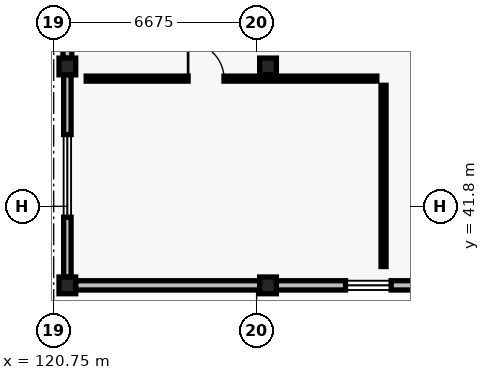
"""IFC4 building model, lengths in metres.
Left out: names, types, materials, properties, quantities, classifications, styles, units other than length and angle.
Written with IfcOpenShell. Run it as: python <this file> out.ifc"""

import sys

from ifc_helpers import new_model, si_unit, direction, frame, frame_2d, origin, origin_2d, place, context, subcontext, project, spatial, rectangle, extrude, element, fill, save


model = new_model("IFC4")
c1 = context("Model", 3, precision=1e-05, world=origin(), true_north=direction((0.0, 1.0)))
c2 = subcontext(c1, "Body", "Model", "MODEL_VIEW")
j1 = project(units=[si_unit("LENGTHUNIT", "METRE"), si_unit("PLANEANGLEUNIT", "RADIAN")], contexts=[c1])
p1 = place(None, origin())
s1 = spatial("IfcSite", under=j1, at=p1, CompositionType="ELEMENT")
p2 = place(p1, origin())
s2 = spatial("IfcBuilding", under=s1, at=p2, CompositionType="ELEMENT")
p3 = place(p2, frame((0.0, 0.0, 27.6)))
s3 = spatial("IfcBuildingStorey", under=s2, at=p3, CompositionType="ELEMENT", Elevation=27.6)
for number, where, z_axis, x_axis in (
    (1, (121.2, 39.2, 0.0), (0.0, 0.0, 1.0), (1.0, 0.0, 0.0)),
    (2, (121.2, 46.4, 0.0), (0.0, 0.0, 1.0), (1.0, 0.0, 0.0)),
    (3, (127.8, 39.2, 0.0), (0.0, 0.0, 1.0), (1.0, 0.0, 0.0)),
    (4, (127.8, 46.4, 0.0), (0.0, 0.0, 1.0), (1.0, 0.0, 0.0)),
):
    element("IfcColumn", number, at=place(p3, frame(where, z_axis=z_axis, x_axis=x_axis)), inside=s3, PredefinedType="COLUMN", context=c2, shape_type="SweptSolid", body=[
        extrude(rectangle(XDim=0.55, YDim=0.55, at=origin_2d()), origin(), (0.0, 0.0, 1.0), 4.3),
    ])
p4 = place(p3, frame((121.2, 39.47, 0.0), z_axis=(0.0, 0.0, 1.0), x_axis=(0.0, 1.0, 0.0)))
e5 = element("IfcWall", 5, at=p4, inside=s3, PredefinedType="STANDARD", context=c2, shape_type="SweptSolid", body=[
    extrude(rectangle(XDim=6.66, YDim=0.245, at=frame_2d((3.33, 0.0))), origin(), (0.0, 0.0, 1.0), 3.835),
])
p5 = place(p4, frame((1.97, 0.0, 0.95)))
e6 = element("IfcOpeningElement", 6, at=p5, cuts=e5, PredefinedType="OPENING", context=c2, shape_type="SweptSolid", body=[
    extrude(rectangle(XDim=2.72, YDim=1.44, at=frame_2d((1.36, 0.72))), frame((0.0, 0.123, 0.0), z_axis=(0.0, -1.0, 0.0), x_axis=(1.0, 0.0, 0.0)), (0.0, 0.0, 1.0), 0.245),
])
p6 = place(p3, frame((121.2, 46.67, 0.0), z_axis=(0.0, 0.0, 1.0), x_axis=(0.0, 1.0, 0.0)))
e7 = element("IfcWall", 7, at=p6, inside=s3, PredefinedType="STANDARD", context=c2, shape_type="SweptSolid", body=[
    extrude(rectangle(XDim=6.66, YDim=0.29, at=frame_2d((3.33, 0.0))), origin(), (0.0, 0.0, 1.0), 3.835),
])
p7 = place(p6, frame((2.43, 0.0, 0.95)))
e8 = element("IfcOpeningElement", 8, at=p7, cuts=e7, PredefinedType="OPENING", context=c2, shape_type="SweptSolid", body=[
    extrude(rectangle(XDim=1.8, YDim=1.65, at=frame_2d((0.9, 0.825))), frame((0.0, 0.145, 0.0), z_axis=(0.0, -1.0, 0.0), x_axis=(1.0, 0.0, 0.0)), (0.0, 0.0, 1.0), 0.29),
])
p8 = place(p3, frame((134.13, 39.2, 0.0), z_axis=(0.0, 0.0, 1.0), x_axis=(-1.0, 0.0, 0.0)))
e9 = element("IfcWall", 9, at=p8, inside=s3, PredefinedType="STANDARD", context=c2, shape_type="SweptSolid", body=[
    extrude(rectangle(XDim=6.06, YDim=0.305, at=frame_2d((3.03, 0.0))), origin(), (0.0, 0.0, 1.0), 3.835),
])
p9 = place(p8, frame((2.28, 0.0, 0.95)))
e10 = element("IfcOpeningElement", 10, at=p9, cuts=e9, PredefinedType="OPENING", context=c2, shape_type="SweptSolid", body=[
    extrude(rectangle(XDim=1.5, YDim=1.65, at=frame_2d((0.75, 0.825))), frame((0.0, 0.152, 0.0), z_axis=(0.0, -1.0, 0.0), x_axis=(1.0, 0.0, 0.0)), (0.0, 0.0, 1.0), 0.305),
])
p10 = place(p3, frame((127.53, 39.2, 0.0), z_axis=(0.0, 0.0, 1.0), x_axis=(-1.0, 0.0, 0.0)))
e11 = element("IfcWall", 11, at=p10, inside=s3, PredefinedType="STANDARD", context=c2, shape_type="SweptSolid", body=[
    extrude(rectangle(XDim=6.06, YDim=0.305, at=frame_2d((3.03, 0.0))), origin(), (0.0, 0.0, 1.0), 3.835),
])
p11 = place(p3, frame((131.6, 39.82, 0.0), z_axis=(0.0, 0.0, 1.0), x_axis=(0.0, 1.0, 0.0)))
e12 = element("IfcWall", 12, at=p11, inside=s3, PredefinedType="PARTITIONING", context=c2, shape_type="SweptSolid", body=[
    extrude(rectangle(XDim=5.96, YDim=0.165, at=frame_2d((2.98, 0.0))), origin(), (0.0, 0.0, 1.0), 3.95),
])
p12 = place(p3, frame((131.38, 46.0, 0.0), z_axis=(0.0, 0.0, 1.0), x_axis=(-1.0, 0.0, 0.0)))
e13 = element("IfcWall", 13, at=p12, inside=s3, PredefinedType="PARTITIONING", context=c2, shape_type="SweptSolid", body=[
    extrude(rectangle(XDim=9.56, YDim=0.165, at=frame_2d((4.78, 0.0))), origin(), (0.0, 0.0, 1.0), 3.95),
])
p13 = place(p12, frame((5.028, 0.0, 0.0)))
e14 = element("IfcOpeningElement", 14, at=p13, cuts=e13, PredefinedType="OPENING", context=c2, shape_type="SweptSolid", body=[
    extrude(rectangle(XDim=1.18, YDim=2.14, at=frame_2d((0.59, 1.07))), frame((0.0, 0.083, 0.0), z_axis=(0.0, -1.0, 0.0), x_axis=(1.0, 0.0, 0.0)), (0.0, 0.0, 1.0), 0.165),
])
p14 = place(p5, origin())
e15 = element("IfcWindow", 15, at=p14, inside=s3, PartitioningType="SINGLE_PANEL", PredefinedType="WINDOW", context=c2, shape_type="SweptSolid", body=[
    extrude(rectangle(XDim=2.72, YDim=1.44, at=frame_2d((1.36, 0.72))), frame((0.0, 0.03, 0.0), z_axis=(0.0, -1.0, 0.0), x_axis=(1.0, 0.0, 0.0)), (0.0, 0.0, 1.0), 0.06),
])
fill(e6, e15)
p15 = place(p9, origin())
e16 = element("IfcWindow", 16, at=p15, inside=s3, PartitioningType="SINGLE_PANEL", PredefinedType="WINDOW", context=c2, shape_type="SweptSolid", body=[
    extrude(rectangle(XDim=1.5, YDim=1.65, at=frame_2d((0.75, 0.825))), frame((0.0, 0.03, 0.0), z_axis=(0.0, -1.0, 0.0), x_axis=(1.0, 0.0, 0.0)), (0.0, 0.0, 1.0), 0.06),
])
fill(e10, e16)
p16 = place(p13, origin())
e17 = element("IfcDoor", 17, at=p16, inside=s3, OperationType="SINGLE_SWING_RIGHT", PredefinedType="DOOR", context=c2, shape_type="SweptSolid", body=[
    extrude(rectangle(XDim=1.18, YDim=2.14, at=frame_2d((0.59, 1.07))), frame((0.0, 0.025, 0.0), z_axis=(0.0, -1.0, 0.0), x_axis=(1.0, 0.0, 0.0)), (0.0, 0.0, 1.0), 0.05),
])
fill(e14, e17)
save(model, sys.argv[1])
